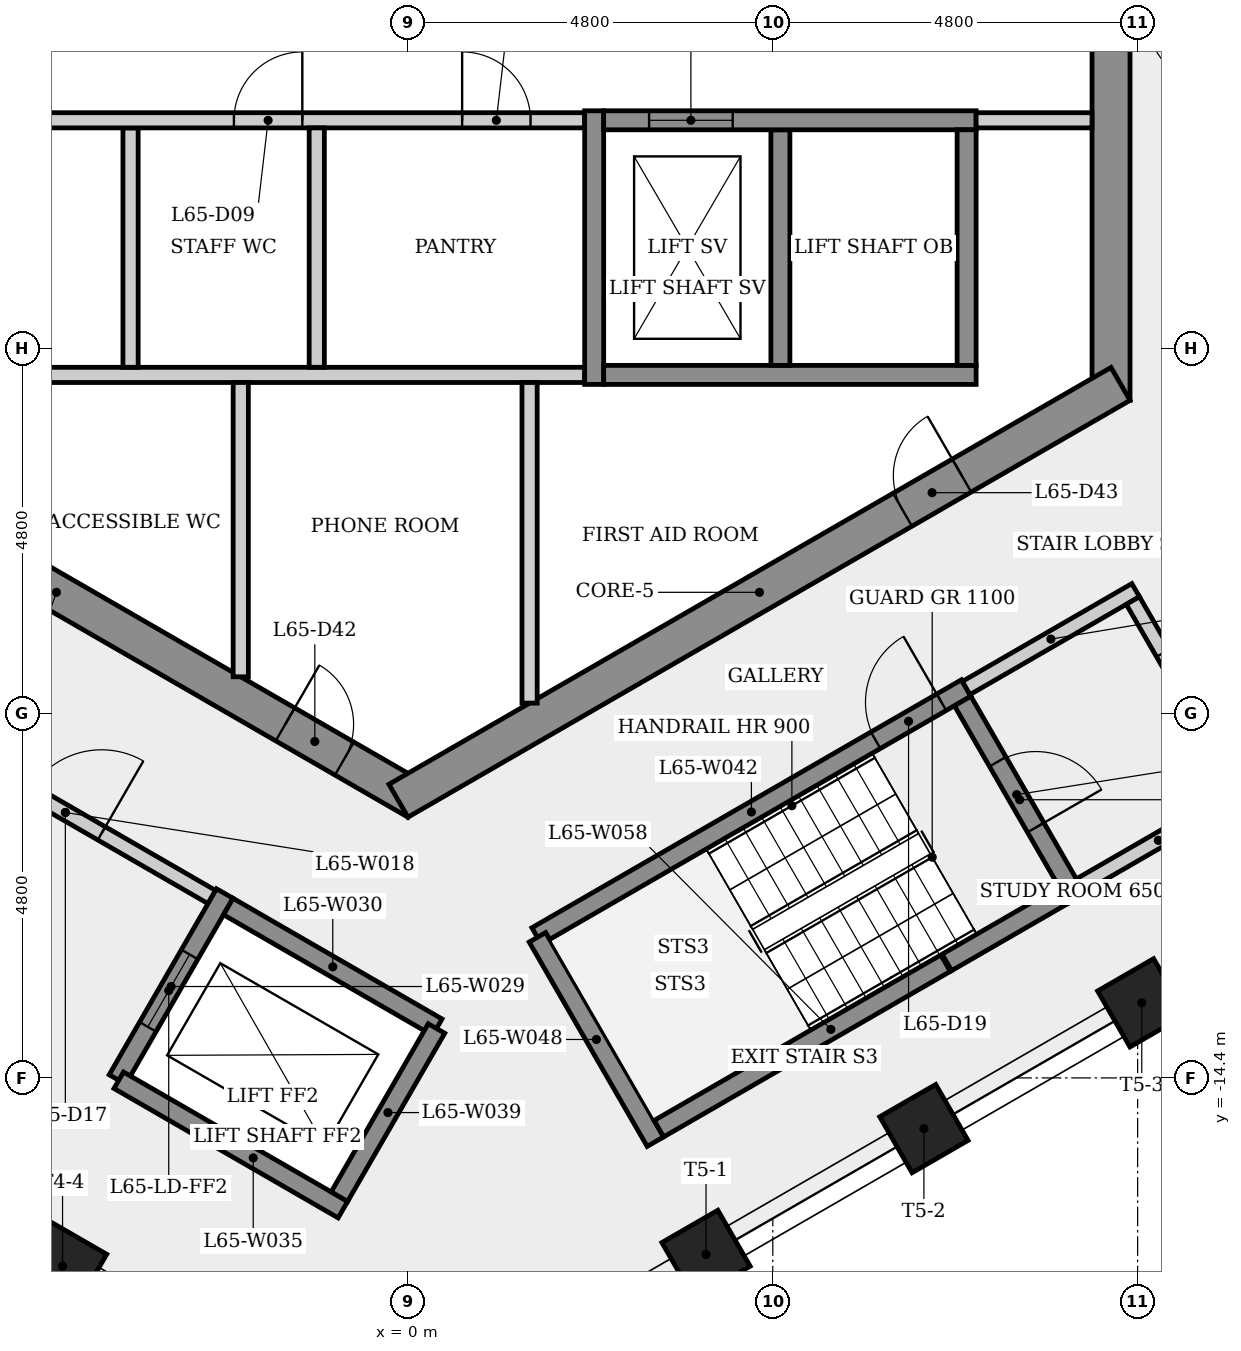
"""IFC4 building model, lengths in metres.
Left out: names, types, materials, properties, quantities, classifications, styles, units other than length and angle.
Written with IfcOpenShell. Run it as: python <this file> out.ifc"""

import sys

from ifc_helpers import new_model, si_unit, direction, frame, frame_2d, origin, origin_2d, place, context, subcontext, project, spatial, rectangle, extrude, element, fill, save


model = new_model("IFC4")
c1 = context("Model", 3, precision=1e-05, world=origin(), true_north=direction((0.0, 1.0)))
c2 = subcontext(c1, "Body", "Model", "MODEL_VIEW")
j1 = project(units=[si_unit("LENGTHUNIT", "METRE"), si_unit("PLANEANGLEUNIT", "RADIAN")], contexts=[c1])
p1 = place(None, origin())
s1 = spatial("IfcSite", under=j1, at=p1, CompositionType="ELEMENT")
p2 = place(p1, origin())
s2 = spatial("IfcBuilding", under=s1, at=p2, CompositionType="ELEMENT")
p3 = place(p2, frame((0.0, 0.0, 242.7)))
s3 = spatial("IfcBuildingStorey", under=s2, at=p3, CompositionType="ELEMENT", Elevation=242.7)
p4 = place(p3, frame((9.25, -5.485, 0.0), z_axis=(0.0, 0.0, 1.0), x_axis=(0.0, 1.0, 0.0)))
e1 = element("IfcWall", 1, at=p4, inside=s3, PredefinedType="SHEAR", context=c2, shape_type="SweptSolid", body=[
    extrude(rectangle(XDim=10.97, YDim=0.5, at=frame_2d((5.485, 0.0))), origin(), (0.0, 0.0, 1.0), 3.4),
])
p5 = place(p4, frame((4.685, 0.0, 0.0)))
e2 = element("IfcOpeningElement", 2, at=p5, cuts=e1, PredefinedType="OPENING", context=c2, shape_type="SweptSolid", body=[
    extrude(rectangle(XDim=1.6, YDim=2.1, at=frame_2d((0.8, 1.05))), frame((0.0, 0.26, 0.0), z_axis=(0.0, -1.0, 0.0), x_axis=(1.0, 0.0, 0.0)), (0.0, 0.0, 1.0), 0.52),
])
p6 = place(p3, frame((-9.375, -5.268, 0.0), z_axis=(0.0, 0.0, 1.0), x_axis=(0.866023993627, -0.500002442456, 0.0)))
e3 = element("IfcWall", 3, at=p6, inside=s3, PredefinedType="SHEAR", context=c2, shape_type="SweptSolid", body=[
    extrude(rectangle(XDim=10.97, YDim=0.5, at=frame_2d((5.485, 0.0))), origin(), (0.0, 0.0, 1.0), 3.4),
])
p7 = place(p6, frame((3.765, 0.0, 0.0)))
e4 = element("IfcOpeningElement", 4, at=p7, cuts=e3, PredefinedType="OPENING", context=c2, shape_type="SweptSolid", body=[
    extrude(rectangle(XDim=0.9, YDim=2.1, at=frame_2d((0.45, 1.05))), frame((0.0, 0.26, 0.0), z_axis=(0.0, -1.0, 0.0), x_axis=(1.0, 0.0, 0.0)), (0.0, 0.0, 1.0), 0.52),
])
p8 = place(p6, frame((8.96, 0.0, 0.0)))
e5 = element("IfcOpeningElement", 5, at=p8, cuts=e3, PredefinedType="OPENING", context=c2, shape_type="SweptSolid", body=[
    extrude(rectangle(XDim=0.9, YDim=2.1, at=frame_2d((0.45, 1.05))), frame((0.0, 0.26, 0.0), z_axis=(0.0, -1.0, 0.0), x_axis=(1.0, 0.0, 0.0)), (0.0, 0.0, 1.0), 0.52),
])
p9 = place(p3, frame((-0.125, -10.753, 0.0), z_axis=(0.0, 0.0, 1.0), x_axis=(0.866023993627, 0.500002442456, 0.0)))
e6 = element("IfcWall", 6, at=p9, inside=s3, PredefinedType="SHEAR", context=c2, shape_type="SweptSolid", body=[
    extrude(rectangle(XDim=10.97, YDim=0.5, at=frame_2d((5.485, 0.0))), origin(), (0.0, 0.0, 1.0), 3.4),
])
p10 = place(p9, frame((7.657, 0.0, 0.0)))
e7 = element("IfcOpeningElement", 7, at=p10, cuts=e6, PredefinedType="OPENING", context=c2, shape_type="SweptSolid", body=[
    extrude(rectangle(XDim=0.9, YDim=2.1, at=frame_2d((0.45, 1.05))), frame((0.0, 0.26, 0.0), z_axis=(0.0, -1.0, 0.0), x_axis=(1.0, 0.0, 0.0)), (0.0, 0.0, 1.0), 0.52),
])
for number, where, z_axis, x_axis in (
    (8, (-4.545, -16.876, 0.0), (0.0, 0.0, 1.0), (-0.5, -0.866, 0.0)),
    (9, (3.921, -16.722, 0.0), (0.0, 0.0, 1.0), (0.5, -0.866, 0.0)),
    (10, (6.788, -15.067, 0.0), (0.0, 0.0, 1.0), (0.5, -0.866, 0.0)),
    (11, (9.655, -13.412, 0.0), (0.0, 0.0, 1.0), (0.5, -0.866, 0.0)),
):
    element("IfcColumn", number, at=place(p3, frame(where, z_axis=z_axis, x_axis=x_axis)), inside=s3, PredefinedType="COLUMN", context=c2, shape_type="SweptSolid", body=[
        extrude(rectangle(XDim=0.85, YDim=0.85, at=origin_2d()), origin(), (0.0, 0.0, 1.0), 3.4),
    ])
p11 = place(p3, frame((-9.0, -5.15, 0.0), z_axis=(0.0, 0.0, 1.0), x_axis=(1.0, 0.0, 0.0)))
e12 = element("IfcWall", 12, at=p11, inside=s3, PredefinedType="PARTITIONING", context=c2, shape_type="SweptSolid", body=[
    extrude(rectangle(XDim=11.325, YDim=0.2, at=frame_2d((5.663, 0.0))), origin(), (0.0, 0.0, 1.0), 3.05),
])
p12 = place(p3, frame((-6.435, -9.795, 0.0), z_axis=(0.0, 0.0, 1.0), x_axis=(0.866012907634, -0.500021643343, 0.0)))
e13 = element("IfcWall", 13, at=p12, inside=s3, PredefinedType="PARTITIONING", context=c2, shape_type="SweptSolid", body=[
    extrude(rectangle(XDim=4.45, YDim=0.2, at=frame_2d((2.225, 0.0))), origin(), (0.0, 0.0, 1.0), 3.05),
])
p13 = place(p12, frame((1.675, 0.0, 0.0)))
e14 = element("IfcOpeningElement", 14, at=p13, cuts=e13, PredefinedType="OPENING", context=c2, shape_type="SweptSolid", body=[
    extrude(rectangle(XDim=1.1, YDim=2.1, at=frame_2d((0.55, 1.05))), frame((0.0, 0.11, 0.0), z_axis=(0.0, -1.0, 0.0), x_axis=(1.0, 0.0, 0.0)), (0.0, 0.0, 1.0), 0.22),
])
p14 = place(p3, frame((-3.65, -1.9, 0.0), z_axis=(0.0, 0.0, 1.0), x_axis=(0.0, -1.0, 0.0)))
e15 = element("IfcWall", 15, at=p14, inside=s3, PredefinedType="PARTITIONING", context=c2, shape_type="SweptSolid", body=[
    extrude(rectangle(XDim=3.15, YDim=0.2, at=frame_2d((1.575, 0.0))), origin(), (0.0, 0.0, 1.0), 3.05),
])
p15 = place(p3, frame((-9.0, -1.8, 0.0), z_axis=(0.0, 0.0, 1.0), x_axis=(1.0, 0.0, 0.0)))
e16 = element("IfcWall", 16, at=p15, inside=s3, PredefinedType="PARTITIONING", context=c2, shape_type="SweptSolid", body=[
    extrude(rectangle(XDim=11.325, YDim=0.2, at=frame_2d((5.663, 0.0))), origin(), (0.0, 0.0, 1.0), 3.05),
])
p16 = place(p15, frame((2.21, 0.0, 0.0)))
e17 = element("IfcOpeningElement", 17, at=p16, cuts=e16, PredefinedType="OPENING", context=c2, shape_type="SweptSolid", body=[
    extrude(rectangle(XDim=0.9, YDim=2.1, at=frame_2d((0.45, 1.05))), frame((0.0, 0.11, 0.0), z_axis=(0.0, -1.0, 0.0), x_axis=(1.0, 0.0, 0.0)), (0.0, 0.0, 1.0), 0.22),
])
p17 = place(p15, frame((6.71, 0.0, 0.0)))
e18 = element("IfcOpeningElement", 18, at=p17, cuts=e16, PredefinedType="OPENING", context=c2, shape_type="SweptSolid", body=[
    extrude(rectangle(XDim=0.9, YDim=2.1, at=frame_2d((0.45, 1.05))), frame((0.0, 0.11, 0.0), z_axis=(0.0, -1.0, 0.0), x_axis=(1.0, 0.0, 0.0)), (0.0, 0.0, 1.0), 0.22),
])
p18 = place(p15, frame((9.713, 0.0, 0.0)))
e19 = element("IfcOpeningElement", 19, at=p18, cuts=e16, PredefinedType="OPENING", context=c2, shape_type="SweptSolid", body=[
    extrude(rectangle(XDim=0.9, YDim=2.1, at=frame_2d((0.45, 1.05))), frame((0.0, 0.11, 0.0), z_axis=(0.0, -1.0, 0.0), x_axis=(1.0, 0.0, 0.0)), (0.0, 0.0, 1.0), 0.22),
])
p19 = place(p3, frame((-2.41, -11.974, 0.0), z_axis=(0.0, 0.0, 1.0), x_axis=(-0.49998675294, -0.866033051843, 0.0)))
e20 = element("IfcWall", 20, at=p19, inside=s3, PredefinedType="SHEAR", context=c2, shape_type="SweptSolid", body=[
    extrude(rectangle(XDim=2.825, YDim=0.25, at=frame_2d((1.413, 0.0))), origin(), (0.0, 0.0, 1.0), 3.05),
])
p20 = place(p19, frame((0.926, 0.0, 0.0)))
e21 = element("IfcOpeningElement", 21, at=p20, cuts=e20, PredefinedType="OPENING", context=c2, shape_type="SweptSolid", body=[
    extrude(rectangle(XDim=1.1, YDim=2.1, at=frame_2d((0.55, 1.05))), frame((0.0, 0.135, 0.0), z_axis=(0.0, -1.0, 0.0), x_axis=(1.0, 0.0, 0.0)), (0.0, 0.0, 1.0), 0.27),
])
p21 = place(p3, frame((-2.364, -12.145, 0.0), z_axis=(0.0, 0.0, 1.0), x_axis=(0.866048579423, -0.499959856469, 0.0)))
e22 = element("IfcWall", 22, at=p21, inside=s3, PredefinedType="SHEAR", context=c2, shape_type="SweptSolid", body=[
    extrude(rectangle(XDim=3.175, YDim=0.25, at=frame_2d((1.587, 0.0))), origin(), (0.0, 0.0, 1.0), 3.4),
])
p22 = place(p3, frame((-2.2, -5.25, 0.0), z_axis=(0.0, 0.0, 1.0), x_axis=(0.0, -1.0, 0.0)))
e23 = element("IfcWall", 23, at=p22, inside=s3, PredefinedType="PARTITIONING", context=c2, shape_type="SweptSolid", body=[
    extrude(rectangle(XDim=3.872, YDim=0.2, at=frame_2d((1.936, 0.0))), origin(), (0.0, 0.0, 1.0), 3.05),
])
p23 = place(p3, frame((-1.2, -1.9, 0.0), z_axis=(0.0, 0.0, 1.0), x_axis=(0.0, -1.0, 0.0)))
e24 = element("IfcWall", 24, at=p23, inside=s3, PredefinedType="PARTITIONING", context=c2, shape_type="SweptSolid", body=[
    extrude(rectangle(XDim=3.15, YDim=0.2, at=frame_2d((1.575, 0.0))), origin(), (0.0, 0.0, 1.0), 3.05),
])
p24 = place(p3, frame((-0.856, -16.133, 0.0), z_axis=(0.0, 0.0, 1.0), x_axis=(-0.866032748241, 0.499987278812, 0.0)))
e25 = element("IfcWall", 25, at=p24, inside=s3, PredefinedType="SHEAR", context=c2, shape_type="SweptSolid", body=[
    extrude(rectangle(XDim=3.405, YDim=0.25, at=frame_2d((1.702, 0.0))), origin(), (0.0, 0.0, 1.0), 3.05),
])
p25 = place(p3, frame((0.375, -13.75, 0.0), z_axis=(0.0, 0.0, 1.0), x_axis=(-0.50003400563, -0.866005769735, 0.0)))
e26 = element("IfcWall", 26, at=p25, inside=s3, PredefinedType="SHEAR", context=c2, shape_type="SweptSolid", body=[
    extrude(rectangle(XDim=2.555, YDim=0.25, at=frame_2d((1.277, 0.0))), origin(), (0.0, 0.0, 1.0), 3.4),
])
p26 = place(p3, frame((1.6, -5.25, 0.0), z_axis=(0.0, 0.0, 1.0), x_axis=(0.0, -1.0, 0.0)))
e27 = element("IfcWall", 27, at=p26, inside=s3, PredefinedType="PARTITIONING", context=c2, shape_type="SweptSolid", body=[
    extrude(rectangle(XDim=4.219, YDim=0.2, at=frame_2d((2.109, 0.0))), origin(), (0.0, 0.0, 1.0), 3.05),
])
p27 = place(p3, frame((1.693, -12.532, 0.0), z_axis=(0.0, 0.0, 1.0), x_axis=(0.866031063448, 0.499990197047, 0.0)))
e28 = element("IfcWall", 28, at=p27, inside=s3, PredefinedType="SHEAR", context=c2, shape_type="SweptSolid", body=[
    extrude(rectangle(XDim=6.525, YDim=0.25, at=frame_2d((3.263, 0.0))), origin(), (0.0, 0.0, 1.0), 3.05),
])
p28 = place(p27, frame((5.15, 0.0, 0.0)))
e29 = element("IfcOpeningElement", 29, at=p28, cuts=e28, PredefinedType="OPENING", context=c2, shape_type="SweptSolid", body=[
    extrude(rectangle(XDim=1.0, YDim=2.1, at=frame_2d((0.5, 1.05))), frame((0.0, 0.135, 0.0), z_axis=(0.0, -1.0, 0.0), x_axis=(1.0, 0.0, 0.0)), (0.0, 0.0, 1.0), 0.27),
])
p29 = place(p3, frame((2.45, -5.275, 0.0), z_axis=(0.0, 0.0, 1.0), x_axis=(0.0, 1.0, 0.0)))
e30 = element("IfcWall", 30, at=p29, inside=s3, PredefinedType="SHEAR", context=c2, shape_type="SweptSolid", body=[
    extrude(rectangle(XDim=3.6, YDim=0.25, at=frame_2d((1.8, 0.0))), origin(), (0.0, 0.0, 1.0), 3.05),
])
p30 = place(p3, frame((3.256, -15.239, 0.0), z_axis=(0.0, 0.0, 1.0), x_axis=(-0.500003782172, 0.866023220135, 0.0)))
e31 = element("IfcWall", 31, at=p30, inside=s3, PredefinedType="SHEAR", context=c2, shape_type="SweptSolid", body=[
    extrude(rectangle(XDim=3.105, YDim=0.25, at=frame_2d((1.552, 0.0))), origin(), (0.0, 0.0, 1.0), 3.05),
])
p31 = place(p3, frame((2.575, -5.15, 0.0), z_axis=(0.0, 0.0, 1.0), x_axis=(1.0, 0.0, 0.0)))
e32 = element("IfcWall", 32, at=p31, inside=s3, PredefinedType="SHEAR", context=c2, shape_type="SweptSolid", body=[
    extrude(rectangle(XDim=4.9, YDim=0.25, at=frame_2d((2.45, 0.0))), origin(), (0.0, 0.0, 1.0), 3.05),
])
p32 = place(p3, frame((4.9, -1.925, 0.0), z_axis=(0.0, 0.0, 1.0), x_axis=(0.0, -1.0, 0.0)))
e33 = element("IfcWall", 33, at=p32, inside=s3, PredefinedType="SHEAR", context=c2, shape_type="SweptSolid", body=[
    extrude(rectangle(XDim=3.1, YDim=0.25, at=frame_2d((1.55, 0.0))), origin(), (0.0, 0.0, 1.0), 3.4),
])
p33 = place(p3, frame((2.575, -1.8, 0.0), z_axis=(0.0, 0.0, 1.0), x_axis=(1.0, 0.0, 0.0)))
e34 = element("IfcWall", 34, at=p33, inside=s3, PredefinedType="SHEAR", context=c2, shape_type="SweptSolid", body=[
    extrude(rectangle(XDim=4.9, YDim=0.25, at=frame_2d((2.45, 0.0))), origin(), (0.0, 0.0, 1.0), 3.05),
])
p34 = place(p33, frame((0.597, 0.0, 0.0)))
e35 = element("IfcOpeningElement", 35, at=p34, cuts=e34, PredefinedType="OPENING", context=c2, shape_type="SweptSolid", body=[
    extrude(rectangle(XDim=1.1, YDim=2.1, at=frame_2d((0.55, 1.05))), frame((0.0, 0.135, 0.0), z_axis=(0.0, -1.0, 0.0), x_axis=(1.0, 0.0, 0.0)), (0.0, 0.0, 1.0), 0.27),
])
p35 = place(p3, frame((7.073, -12.891, 0.0), z_axis=(0.0, 0.0, 1.0), x_axis=(-0.866023145199, -0.500003911965, 0.0)))
e36 = element("IfcWall", 36, at=p35, inside=s3, PredefinedType="SHEAR", context=c2, shape_type="SweptSolid", body=[
    extrude(rectangle(XDim=4.355, YDim=0.25, at=frame_2d((2.177, 0.0))), origin(), (0.0, 0.0, 1.0), 3.05),
])
p36 = place(p3, frame((7.298, -9.441, 0.0), z_axis=(0.0, 0.0, 1.0), x_axis=(0.50002537861, -0.866010750942, 0.0)))
e37 = element("IfcWall", 37, at=p36, inside=s3, PredefinedType="SHEAR", context=c2, shape_type="SweptSolid", body=[
    extrude(rectangle(XDim=3.0, YDim=0.25, at=frame_2d((1.5, 0.0))), origin(), (0.0, 0.0, 1.0), 3.05),
])
p37 = place(p36, frame((0.923, 0.0, 0.0)))
e38 = element("IfcOpeningElement", 38, at=p37, cuts=e37, PredefinedType="OPENING", context=c2, shape_type="SweptSolid", body=[
    extrude(rectangle(XDim=1.0, YDim=2.1, at=frame_2d((0.5, 1.05))), frame((0.0, 0.135, 0.0), z_axis=(0.0, -1.0, 0.0), x_axis=(1.0, 0.0, 0.0)), (0.0, 0.0, 1.0), 0.27),
])
p38 = place(p3, frame((7.344, -9.27, 0.0), z_axis=(0.0, 0.0, 1.0), x_axis=(0.866005588531, 0.500034319456, 0.0)))
e39 = element("IfcWall", 39, at=p38, inside=s3, PredefinedType="PARTITIONING", context=c2, shape_type="SweptSolid", body=[
    extrude(rectangle(XDim=2.575, YDim=0.2, at=frame_2d((1.288, 0.0))), origin(), (0.0, 0.0, 1.0), 3.05),
])
p39 = place(p3, frame((7.35, -1.925, 0.0), z_axis=(0.0, 0.0, 1.0), x_axis=(0.0, -1.0, 0.0)))
e40 = element("IfcWall", 40, at=p39, inside=s3, PredefinedType="SHEAR", context=c2, shape_type="SweptSolid", body=[
    extrude(rectangle(XDim=3.1, YDim=0.25, at=frame_2d((1.55, 0.0))), origin(), (0.0, 0.0, 1.0), 3.4),
])
p40 = place(p3, frame((8.627, -11.993, 0.0), z_axis=(0.0, 0.0, 1.0), x_axis=(-0.866059624469, -0.499940723351, 0.0)))
e41 = element("IfcWall", 41, at=p40, inside=s3, PredefinedType="SHEAR", context=c2, shape_type="SweptSolid", body=[
    extrude(rectangle(XDim=1.775, YDim=0.25, at=frame_2d((0.888, 0.0))), origin(), (0.0, 0.0, 1.0), 3.05),
])
p41 = place(p3, frame((9.0, -1.8, 0.0), z_axis=(0.0, 0.0, 1.0), x_axis=(-1.0, 0.0, 0.0)))
e42 = element("IfcWall", 42, at=p41, inside=s3, PredefinedType="PARTITIONING", context=c2, shape_type="SweptSolid", body=[
    extrude(rectangle(XDim=1.525, YDim=0.2, at=frame_2d((0.763, 0.0))), origin(), (0.0, 0.0, 1.0), 3.05),
])
p42 = place(p3, frame((9.537, -8.119, 0.0), z_axis=(0.0, 0.0, 1.0), x_axis=(0.499990139034, -0.866031096941, 0.0)))
e43 = element("IfcWall", 43, at=p42, inside=s3, PredefinedType="PARTITIONING", context=c2, shape_type="SweptSolid", body=[
    extrude(rectangle(XDim=3.0, YDim=0.2, at=frame_2d((1.5, 0.0))), origin(), (0.0, 0.0, 1.0), 3.05),
])
p43 = place(p42, frame((0.797, 0.0, 0.0)))
e44 = element("IfcOpeningElement", 44, at=p43, cuts=e43, PredefinedType="OPENING", context=c2, shape_type="SweptSolid", body=[
    extrude(rectangle(XDim=1.0, YDim=2.1, at=frame_2d((0.5, 1.05))), frame((0.0, 0.11, 0.0), z_axis=(0.0, -1.0, 0.0), x_axis=(1.0, 0.0, 0.0)), (0.0, 0.0, 1.0), 0.22),
])
p44 = place(p3, frame((10.901, -10.681, 0.0), z_axis=(0.0, 0.0, 1.0), x_axis=(-0.866007538022, -0.500030943131, 0.0)))
e45 = element("IfcWall", 45, at=p44, inside=s3, PredefinedType="PARTITIONING", context=c2, shape_type="SweptSolid", body=[
    extrude(rectangle(XDim=2.375, YDim=0.2, at=frame_2d((1.188, 0.0))), origin(), (0.0, 0.0, 1.0), 3.05),
])
p45 = place(p34, origin())
e46 = element("IfcDoor", 46, at=p45, inside=s3, OperationType="SLIDING_TO_LEFT", PredefinedType="DOOR", context=c2, shape_type="SweptSolid", body=[
    extrude(rectangle(XDim=1.1, YDim=2.1, at=frame_2d((0.55, 1.05))), frame((0.0, 0.025, 0.0), z_axis=(0.0, -1.0, 0.0), x_axis=(1.0, 0.0, 0.0)), (0.0, 0.0, 1.0), 0.05),
])
fill(e35, e46)
p46 = place(p17, origin())
e47 = element("IfcDoor", 47, at=p46, inside=s3, OperationType="SINGLE_SWING_RIGHT", PredefinedType="DOOR", context=c2, shape_type="SweptSolid", body=[
    extrude(rectangle(XDim=0.9, YDim=2.1, at=frame_2d((0.45, 1.05))), frame((0.0, 0.025, 0.0), z_axis=(0.0, -1.0, 0.0), x_axis=(1.0, 0.0, 0.0)), (0.0, 0.0, 1.0), 0.05),
])
fill(e18, e47)
p47 = place(p18, origin())
e48 = element("IfcDoor", 48, at=p47, inside=s3, OperationType="SINGLE_SWING_LEFT", PredefinedType="DOOR", context=c2, shape_type="SweptSolid", body=[
    extrude(rectangle(XDim=0.9, YDim=2.1, at=frame_2d((0.45, 1.05))), frame((0.0, 0.025, 0.0), z_axis=(0.0, -1.0, 0.0), x_axis=(1.0, 0.0, 0.0)), (0.0, 0.0, 1.0), 0.05),
])
fill(e19, e48)
p48 = place(p13, origin())
e49 = element("IfcDoor", 49, at=p48, inside=s3, OperationType="SINGLE_SWING_RIGHT", PredefinedType="DOOR", context=c2, shape_type="SweptSolid", body=[
    extrude(rectangle(XDim=1.1, YDim=2.1, at=frame_2d((0.55, 1.05))), frame((0.0, 0.025, 0.0), z_axis=(0.0, -1.0, 0.0), x_axis=(1.0, 0.0, 0.0)), (0.0, 0.0, 1.0), 0.05),
])
fill(e14, e49)
p49 = place(p20, origin())
e50 = element("IfcDoor", 50, at=p49, inside=s3, OperationType="SLIDING_TO_LEFT", PredefinedType="DOOR", context=c2, shape_type="SweptSolid", body=[
    extrude(rectangle(XDim=1.1, YDim=2.1, at=frame_2d((0.55, 1.05))), frame((0.0, 0.025, 0.0), z_axis=(0.0, -1.0, 0.0), x_axis=(1.0, 0.0, 0.0)), (0.0, 0.0, 1.0), 0.05),
])
fill(e21, e50)
p50 = place(p28, origin())
e51 = element("IfcDoor", 51, at=p50, inside=s3, OperationType="SINGLE_SWING_RIGHT", PredefinedType="DOOR", context=c2, shape_type="SweptSolid", body=[
    extrude(rectangle(XDim=1.0, YDim=2.1, at=frame_2d((0.5, 1.05))), frame((0.0, 0.025, 0.0), z_axis=(0.0, -1.0, 0.0), x_axis=(1.0, 0.0, 0.0)), (0.0, 0.0, 1.0), 0.05),
])
fill(e29, e51)
p51 = place(p37, origin())
e52 = element("IfcDoor", 52, at=p51, inside=s3, OperationType="SINGLE_SWING_RIGHT", PredefinedType="DOOR", context=c2, shape_type="SweptSolid", body=[
    extrude(rectangle(XDim=1.0, YDim=2.1, at=frame_2d((0.5, 1.05))), frame((0.0, 0.025, 0.0), z_axis=(0.0, -1.0, 0.0), x_axis=(1.0, 0.0, 0.0)), (0.0, 0.0, 1.0), 0.05),
])
fill(e38, e52)
p52 = place(p8, origin())
e53 = element("IfcDoor", 53, at=p52, inside=s3, OperationType="SINGLE_SWING_LEFT", PredefinedType="DOOR", context=c2, shape_type="SweptSolid", body=[
    extrude(rectangle(XDim=0.9, YDim=2.1, at=frame_2d((0.45, 1.05))), frame((0.0, 0.025, 0.0), z_axis=(0.0, -1.0, 0.0), x_axis=(1.0, 0.0, 0.0)), (0.0, 0.0, 1.0), 0.05),
])
fill(e5, e53)
p53 = place(p10, origin())
e54 = element("IfcDoor", 54, at=p53, inside=s3, OperationType="SINGLE_SWING_RIGHT", PredefinedType="DOOR", context=c2, shape_type="SweptSolid", body=[
    extrude(rectangle(XDim=0.9, YDim=2.1, at=frame_2d((0.45, 1.05))), frame((0.0, 0.025, 0.0), z_axis=(0.0, -1.0, 0.0), x_axis=(1.0, 0.0, 0.0)), (0.0, 0.0, 1.0), 0.05),
])
fill(e7, e54)
save(model, sys.argv[1])
